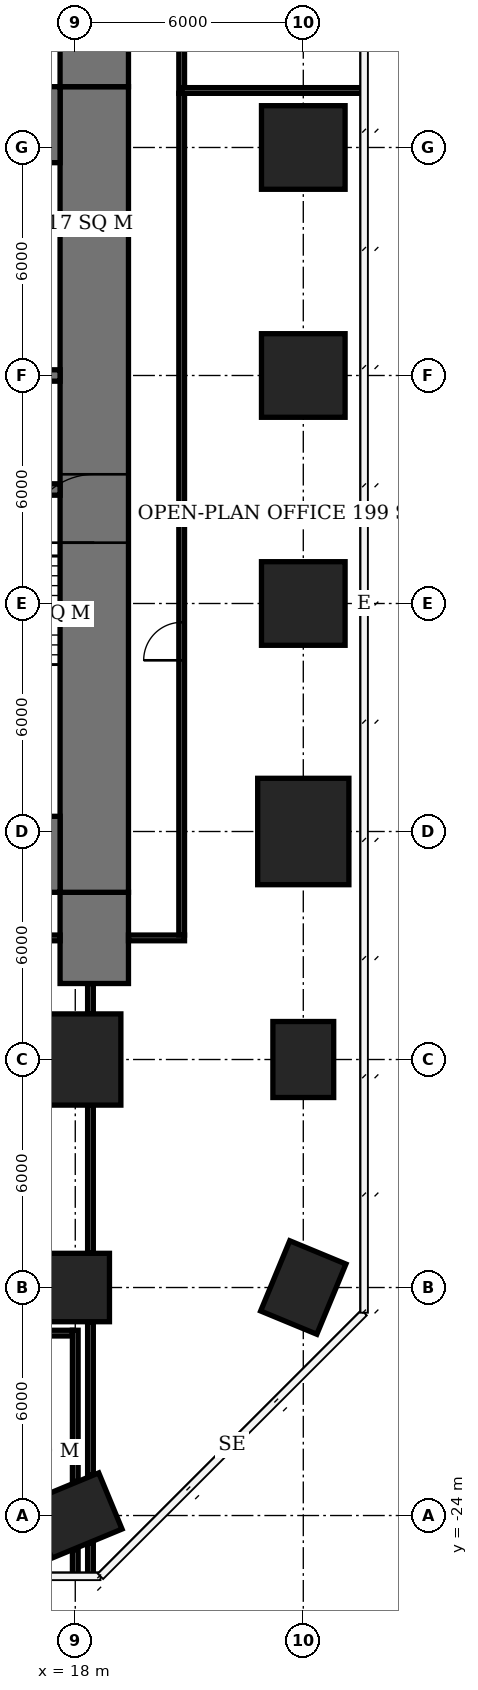
"""IFC4 building model, lengths in metres.
Left out: names, types, materials, properties, quantities, classifications, styles, units other than length and angle.
Written with IfcOpenShell. Run it as: python <this file> out.ifc"""

import sys

from ifc_helpers import new_model, si_unit, direction, frame, frame_2d, origin, origin_2d, place, context, subcontext, project, spatial, rectangle, extrude, element, fill, save


model = new_model("IFC4")
c1 = context("Model", 3, precision=1e-05, world=origin(), true_north=direction((0.0, 1.0)))
c2 = subcontext(c1, "Body", "Model", "MODEL_VIEW")
j1 = project(units=[si_unit("LENGTHUNIT", "METRE"), si_unit("PLANEANGLEUNIT", "RADIAN")], contexts=[c1])
p1 = place(None, origin())
s1 = spatial("IfcSite", under=j1, at=p1, CompositionType="ELEMENT")
p2 = place(p1, origin())
s2 = spatial("IfcBuilding", under=s1, at=p2, CompositionType="ELEMENT")
p3 = place(p2, frame((0.0, 0.0, 22.1)))
s3 = spatial("IfcBuildingStorey", under=s2, at=p3, CompositionType="ELEMENT", Elevation=22.1)
p4 = place(p3, frame((18.0, -24.0, 0.0), z_axis=(0.0, 0.0, 1.0), x_axis=(-0.923879532511, -0.382683432365, 0.0)))
e1 = element("IfcColumn", 1, at=p4, inside=s3, PredefinedType="COLUMN", context=c2, shape_type="SweptSolid", body=[
    extrude(rectangle(XDim=2.0, YDim=1.6, at=origin_2d()), origin(), (0.0, 0.0, 1.0), 3.9),
])
p5 = place(p3, frame((18.0, -18.0, -0.55), z_axis=(0.0, 0.0, 1.0), x_axis=(1.0, 0.0, 0.0)))
e2 = element("IfcColumn", 2, at=p5, inside=s3, PredefinedType="COLUMN", context=c2, shape_type="SweptSolid", body=[
    extrude(rectangle(XDim=1.8, YDim=1.8, at=origin_2d()), origin(), (0.0, 0.0, 1.0), 4.45),
])
p6 = place(p3, frame((18.0, -12.0, 0.0), z_axis=(0.0, 0.0, 1.0), x_axis=(1.0, 0.0, 0.0)))
e3 = element("IfcColumn", 3, at=p6, inside=s3, PredefinedType="COLUMN", context=c2, shape_type="SweptSolid", body=[
    extrude(rectangle(XDim=2.4, YDim=2.4, at=origin_2d()), origin(), (0.0, 0.0, 1.0), 3.9),
])
for number, where, z_axis, x_axis in (
    (4, (24.0, -18.0, 0.0), (0.0, 0.0, 1.0), (-0.383, -0.924, 0.0)),
    (5, (24.0, -12.0, 0.0), (0.0, 0.0, 1.0), (0.0, 1.0, 0.0)),
):
    element("IfcColumn", number, at=place(p3, frame(where, z_axis=z_axis, x_axis=x_axis)), inside=s3, PredefinedType="COLUMN", context=c2, shape_type="SweptSolid", body=[
        extrude(rectangle(XDim=2.0, YDim=1.6, at=origin_2d()), origin(), (0.0, 0.0, 1.0), 3.9),
    ])
p7 = place(p3, frame((24.0, -6.0, 0.0), z_axis=(0.0, 0.0, 1.0), x_axis=(0.0, 1.0, 0.0)))
e6 = element("IfcColumn", 6, at=p7, inside=s3, PredefinedType="COLUMN", context=c2, shape_type="SweptSolid", body=[
    extrude(rectangle(XDim=2.8, YDim=2.4, at=origin_2d()), origin(), (0.0, 0.0, 1.0), 3.9),
])
for number, where, z_axis, x_axis in (
    (7, (24.0, 0.0, 0.0), (0.0, 0.0, 1.0), (1.0, 0.0, 0.0)),
    (8, (24.0, 6.0, 0.0), (0.0, 0.0, 1.0), (1.0, 0.0, 0.0)),
    (9, (24.0, 12.0, 0.0), (0.0, 0.0, 1.0), (1.0, 0.0, 0.0)),
):
    element("IfcColumn", number, at=place(p3, frame(where, z_axis=z_axis, x_axis=x_axis)), inside=s3, PredefinedType="COLUMN", context=c2, shape_type="SweptSolid", body=[
        extrude(rectangle(XDim=2.2, YDim=2.2, at=origin_2d()), origin(), (0.0, 0.0, 1.0), 3.9),
    ])
for number, where, z_axis, x_axis in (
    (10, (-5.6, -6.6, 0.0), (0.0, 0.0, 1.0), (1.0, 0.0, 0.0)),
    (11, (-5.6, 12.6, 0.0), (0.0, 0.0, 1.0), (1.0, 0.0, 0.0)),
):
    element("IfcWall", number, at=place(p3, frame(where, z_axis=z_axis, x_axis=x_axis)), inside=s3, PredefinedType="SHEAR", context=c2, shape_type="SweptSolid", body=[
        extrude(rectangle(XDim=23.2, YDim=2.0, at=frame_2d((11.6, 0.0))), origin(), (0.0, 0.0, 1.0), 3.9),
    ])
p8 = place(p3, frame((18.5, -7.6, 0.0), z_axis=(0.0, 0.0, 1.0), x_axis=(0.0, 1.0, 0.0)))
e12 = element("IfcWall", 12, at=p8, inside=s3, PredefinedType="SHEAR", context=c2, shape_type="SweptSolid", body=[
    extrude(rectangle(XDim=21.2, YDim=1.8, at=frame_2d((10.6, 0.0))), origin(), (0.0, 0.0, 1.0), 3.9),
])
p9 = place(p8, frame((9.2, 0.0, 0.0)))
e13 = element("IfcOpeningElement", 13, at=p9, cuts=e12, PredefinedType="OPENING", context=c2, shape_type="SweptSolid", body=[
    extrude(rectangle(XDim=1.8, YDim=2.4, at=frame_2d((0.9, 1.2))), frame((0.0, 0.91, 0.0), z_axis=(0.0, -1.0, 0.0), x_axis=(1.0, 0.0, 0.0)), (0.0, 0.0, 1.0), 1.82),
])
for number, where, z_axis, x_axis in (
    (14, (18.5, -10.0, 0.0), (0.0, 0.0, 1.0), (0.0, 1.0, 0.0)),
    (15, (18.5, 13.6, 0.0), (0.0, 0.0, 1.0), (0.0, 1.0, 0.0)),
):
    element("IfcWall", number, at=place(p3, frame(where, z_axis=z_axis, x_axis=x_axis)), inside=s3, PredefinedType="SHEAR", context=c2, shape_type="SweptSolid", body=[
        extrude(rectangle(XDim=2.4, YDim=1.8, at=frame_2d((1.2, 0.0))), origin(), (0.0, 0.0, 1.0), 3.9),
    ])
p10 = place(p3, frame((12.15, 3.0, 0.0), z_axis=(0.0, 0.0, 1.0), x_axis=(1.0, 0.0, 0.0)))
e16 = element("IfcWall", 16, at=p10, inside=s3, PredefinedType="SHEAR", context=c2, shape_type="SweptSolid", body=[
    extrude(rectangle(XDim=5.45, YDim=0.3, at=frame_2d((2.725, 0.0))), origin(), (0.0, 0.0, 1.0), 3.9),
])
p11 = place(p10, frame((3.25, 0.0, 0.0)))
e17 = element("IfcOpeningElement", 17, at=p11, cuts=e16, PredefinedType="OPENING", context=c2, shape_type="SweptSolid", body=[
    extrude(rectangle(XDim=1.2, YDim=2.1, at=frame_2d((0.6, 1.05))), frame((0.0, 0.16, 0.0), z_axis=(0.0, -1.0, 0.0), x_axis=(1.0, 0.0, 0.0)), (0.0, 0.0, 1.0), 0.32),
])
p12 = place(p10, frame((0.45, 0.0, 0.0)))
e18 = element("IfcOpeningElement", 18, at=p12, cuts=e16, PredefinedType="OPENING", context=c2, shape_type="SweptSolid", body=[
    extrude(rectangle(XDim=0.9, YDim=2.1, at=frame_2d((0.45, 1.05))), frame((0.0, 0.16, 0.0), z_axis=(0.0, -1.0, 0.0), x_axis=(1.0, 0.0, 0.0)), (0.0, 0.0, 1.0), 0.32),
])
p13 = place(p3, frame((-0.15, 6.0, 0.0), z_axis=(0.0, 0.0, 1.0), x_axis=(1.0, 0.0, 0.0)))
e19 = element("IfcWall", 19, at=p13, inside=s3, PredefinedType="SHEAR", context=c2, shape_type="SweptSolid", body=[
    extrude(rectangle(XDim=17.75, YDim=0.3, at=frame_2d((8.875, 0.0))), origin(), (0.0, 0.0, 1.0), 3.9),
])
p14 = place(p13, frame((13.15, 0.0, 0.0)))
e20 = element("IfcOpeningElement", 20, at=p14, cuts=e19, PredefinedType="OPENING", context=c2, shape_type="SweptSolid", body=[
    extrude(rectangle(XDim=0.9, YDim=2.1, at=frame_2d((0.45, 1.05))), frame((0.0, 0.16, 0.0), z_axis=(0.0, -1.0, 0.0), x_axis=(1.0, 0.0, 0.0)), (0.0, 0.0, 1.0), 0.32),
])
p15 = place(p13, frame((16.25, 0.0, 0.0)))
e21 = element("IfcOpeningElement", 21, at=p15, cuts=e19, PredefinedType="OPENING", context=c2, shape_type="SweptSolid", body=[
    extrude(rectangle(XDim=1.0, YDim=2.1, at=frame_2d((0.5, 1.05))), frame((0.0, 0.16, 0.0), z_axis=(0.0, -1.0, 0.0), x_axis=(1.0, 0.0, 0.0)), (0.0, 0.0, 1.0), 0.32),
])
p16 = place(p13, frame((1.1, 0.0, 0.0)))
e22 = element("IfcOpeningElement", 22, at=p16, cuts=e19, PredefinedType="OPENING", context=c2, shape_type="SweptSolid", body=[
    extrude(rectangle(XDim=1.1, YDim=2.1, at=frame_2d((0.55, 1.05))), frame((0.0, 0.16, 0.0), z_axis=(0.0, -1.0, 0.0), x_axis=(1.0, 0.0, 0.0)), (0.0, 0.0, 1.0), 0.32),
])
p17 = place(p13, frame((4.1, 0.0, 0.0)))
e23 = element("IfcOpeningElement", 23, at=p17, cuts=e19, PredefinedType="OPENING", context=c2, shape_type="SweptSolid", body=[
    extrude(rectangle(XDim=1.1, YDim=2.1, at=frame_2d((0.55, 1.05))), frame((0.0, 0.16, 0.0), z_axis=(0.0, -1.0, 0.0), x_axis=(1.0, 0.0, 0.0)), (0.0, 0.0, 1.0), 0.32),
])
p18 = place(p13, frame((7.1, 0.0, 0.0)))
e24 = element("IfcOpeningElement", 24, at=p18, cuts=e19, PredefinedType="OPENING", context=c2, shape_type="SweptSolid", body=[
    extrude(rectangle(XDim=1.1, YDim=2.1, at=frame_2d((0.55, 1.05))), frame((0.0, 0.16, 0.0), z_axis=(0.0, -1.0, 0.0), x_axis=(1.0, 0.0, 0.0)), (0.0, 0.0, 1.0), 0.32),
])
p19 = place(p13, frame((10.1, 0.0, 0.0)))
e25 = element("IfcOpeningElement", 25, at=p19, cuts=e19, PredefinedType="OPENING", context=c2, shape_type="SweptSolid", body=[
    extrude(rectangle(XDim=1.1, YDim=2.1, at=frame_2d((0.55, 1.05))), frame((0.0, 0.16, 0.0), z_axis=(0.0, -1.0, 0.0), x_axis=(1.0, 0.0, 0.0)), (0.0, 0.0, 1.0), 0.32),
])
p20 = place(p3, frame((12.075, -19.2, 0.0), z_axis=(0.0, 0.0, 1.0), x_axis=(1.0, 0.0, 0.0)))
e26 = element("IfcWall", 26, at=p20, inside=s3, PredefinedType="PARTITIONING", context=c2, shape_type="SweptSolid", body=[
    extrude(rectangle(XDim=5.85, YDim=0.15, at=frame_2d((2.925, 0.0))), origin(), (0.0, 0.0, 1.0), 3.65),
])
p21 = place(p20, frame((2.425, 0.0, 0.0)))
e27 = element("IfcOpeningElement", 27, at=p21, cuts=e26, PredefinedType="OPENING", context=c2, shape_type="SweptSolid", body=[
    extrude(rectangle(XDim=1.0, YDim=2.1, at=frame_2d((0.5, 1.05))), frame((0.0, 0.085, 0.0), z_axis=(0.0, -1.0, 0.0), x_axis=(1.0, 0.0, 0.0)), (0.0, 0.0, 1.0), 0.17),
])
p22 = place(p3, frame((18.0, -25.6, 0.0), z_axis=(0.0, 0.0, 1.0), x_axis=(0.0, 1.0, 0.0)))
e28 = element("IfcWall", 28, at=p22, inside=s3, PredefinedType="PARTITIONING", context=c2, shape_type="SweptSolid", body=[
    extrude(rectangle(XDim=0.703, YDim=0.15, at=frame_2d((0.352, 0.0))), origin(), (0.0, 0.0, 1.0), 3.65),
])
p23 = place(p3, frame((18.0, -23.103, 0.0), z_axis=(0.0, 0.0, 1.0), x_axis=(0.0, 1.0, 0.0)))
e29 = element("IfcWall", 29, at=p23, inside=s3, PredefinedType="PARTITIONING", context=c2, shape_type="SweptSolid", body=[
    extrude(rectangle(XDim=3.978, YDim=0.15, at=frame_2d((1.989, 0.0))), origin(), (0.0, 0.0, 1.0), 3.65),
])
p24 = place(p3, frame((7.575, -8.8, 0.0), z_axis=(0.0, 0.0, 1.0), x_axis=(1.0, 0.0, 0.0)))
e30 = element("IfcWall", 30, at=p24, inside=s3, PredefinedType="PARTITIONING", context=c2, shape_type="SweptSolid", body=[
    extrude(rectangle(XDim=10.025, YDim=0.15, at=frame_2d((5.013, 0.0))), origin(), (0.0, 0.0, 1.0), 3.65),
])
p25 = place(p24, frame((2.96, 0.0, 0.0)))
e31 = element("IfcOpeningElement", 31, at=p25, cuts=e30, PredefinedType="OPENING", context=c2, shape_type="SweptSolid", body=[
    extrude(rectangle(XDim=1.0, YDim=2.1, at=frame_2d((0.5, 1.05))), frame((0.0, 0.085, 0.0), z_axis=(0.0, -1.0, 0.0), x_axis=(1.0, 0.0, 0.0)), (0.0, 0.0, 1.0), 0.17),
])
p26 = place(p3, frame((18.4, -25.6, 0.0), z_axis=(0.0, 0.0, 1.0), x_axis=(0.0, 1.0, 0.0)))
e32 = element("IfcWall", 32, at=p26, inside=s3, PredefinedType="PARTITIONING", context=c2, shape_type="SweptSolid", body=[
    extrude(rectangle(XDim=0.869, YDim=0.15, at=frame_2d((0.435, 0.0))), origin(), (0.0, 0.0, 1.0), 3.65),
])
p27 = place(p3, frame((18.4, -22.937, 0.0), z_axis=(0.0, 0.0, 1.0), x_axis=(0.0, 1.0, 0.0)))
e33 = element("IfcWall", 33, at=p27, inside=s3, PredefinedType="PARTITIONING", context=c2, shape_type="SweptSolid", body=[
    extrude(rectangle(XDim=4.037, YDim=0.15, at=frame_2d((2.019, 0.0))), origin(), (0.0, 0.0, 1.0), 3.65),
])
p28 = place(p3, frame((18.4, -17.1, 0.0), z_axis=(0.0, 0.0, 1.0), x_axis=(0.0, 1.0, 0.0)))
e34 = element("IfcWall", 34, at=p28, inside=s3, PredefinedType="PARTITIONING", context=c2, shape_type="SweptSolid", body=[
    extrude(rectangle(XDim=3.9, YDim=0.15, at=frame_2d((1.95, 0.0))), origin(), (0.0, 0.0, 1.0), 3.65),
])
p29 = place(p3, frame((18.4, -10.8, 0.0), z_axis=(0.0, 0.0, 1.0), x_axis=(0.0, 1.0, 0.0)))
e35 = element("IfcWall", 35, at=p29, inside=s3, PredefinedType="PARTITIONING", context=c2, shape_type="SweptSolid", body=[
    extrude(rectangle(XDim=0.8, YDim=0.15, at=frame_2d((0.4, 0.0))), origin(), (0.0, 0.0, 1.0), 3.65),
])
p30 = place(p3, frame((19.4, -8.8, 0.0), z_axis=(0.0, 0.0, 1.0), x_axis=(1.0, 0.0, 0.0)))
e36 = element("IfcWall", 36, at=p30, inside=s3, PredefinedType="PARTITIONING", context=c2, shape_type="SweptSolid", body=[
    extrude(rectangle(XDim=1.475, YDim=0.15, at=frame_2d((0.738, 0.0))), origin(), (0.0, 0.0, 1.0), 3.65),
])
p31 = place(p3, frame((20.8, -8.725, 0.0), z_axis=(0.0, 0.0, 1.0), x_axis=(0.0, 1.0, 0.0)))
e37 = element("IfcWall", 37, at=p31, inside=s3, PredefinedType="PARTITIONING", context=c2, shape_type="SweptSolid", body=[
    extrude(rectangle(XDim=22.15, YDim=0.15, at=frame_2d((11.075, 0.0))), origin(), (0.0, 0.0, 1.0), 3.65),
])
p32 = place(p31, frame((7.23, 0.0, 0.0)))
e38 = element("IfcOpeningElement", 38, at=p32, cuts=e37, PredefinedType="OPENING", context=c2, shape_type="SweptSolid", body=[
    extrude(rectangle(XDim=1.0, YDim=2.1, at=frame_2d((0.5, 1.05))), frame((0.0, 0.085, 0.0), z_axis=(0.0, -1.0, 0.0), x_axis=(1.0, 0.0, 0.0)), (0.0, 0.0, 1.0), 0.17),
])
p33 = place(p3, frame((20.8, 13.425, 0.0), z_axis=(0.0, 0.0, 1.0), x_axis=(0.0, 1.0, 0.0)))
e39 = element("IfcWall", 39, at=p33, inside=s3, PredefinedType="PARTITIONING", context=c2, shape_type="SweptSolid", body=[
    extrude(rectangle(XDim=1.3, YDim=0.15, at=frame_2d((0.65, 0.0))), origin(), (0.0, 0.0, 1.0), 3.65),
])
p34 = place(p3, frame((20.8, 13.5, 0.0), z_axis=(0.0, 0.0, 1.0), x_axis=(1.0, 0.0, 0.0)))
e40 = element("IfcWall", 40, at=p34, inside=s3, PredefinedType="PARTITIONING", context=c2, shape_type="SweptSolid", body=[
    extrude(rectangle(XDim=4.8, YDim=0.15, at=frame_2d((2.4, 0.0))), origin(), (0.0, 0.0, 1.0), 3.65),
])
p35 = place(p9, origin())
e41 = element("IfcDoor", 41, at=p35, inside=s3, OperationType="DOUBLE_DOOR_SINGLE_SWING", PredefinedType="DOOR", context=c2, shape_type="SweptSolid", body=[
    extrude(rectangle(XDim=1.8, YDim=2.4, at=frame_2d((0.9, 1.2))), frame((0.0, 0.025, 0.0), z_axis=(0.0, -1.0, 0.0), x_axis=(1.0, 0.0, 0.0)), (0.0, 0.0, 1.0), 0.05),
])
fill(e13, e41)
p36 = place(p32, origin())
e42 = element("IfcDoor", 42, at=p36, inside=s3, OperationType="SINGLE_SWING_LEFT", PredefinedType="DOOR", context=c2, shape_type="SweptSolid", body=[
    extrude(rectangle(XDim=1.0, YDim=2.1, at=frame_2d((0.5, 1.05))), frame((0.0, 0.025, 0.0), z_axis=(0.0, -1.0, 0.0), x_axis=(1.0, 0.0, 0.0)), (0.0, 0.0, 1.0), 0.05),
])
fill(e38, e42)
save(model, sys.argv[1])
